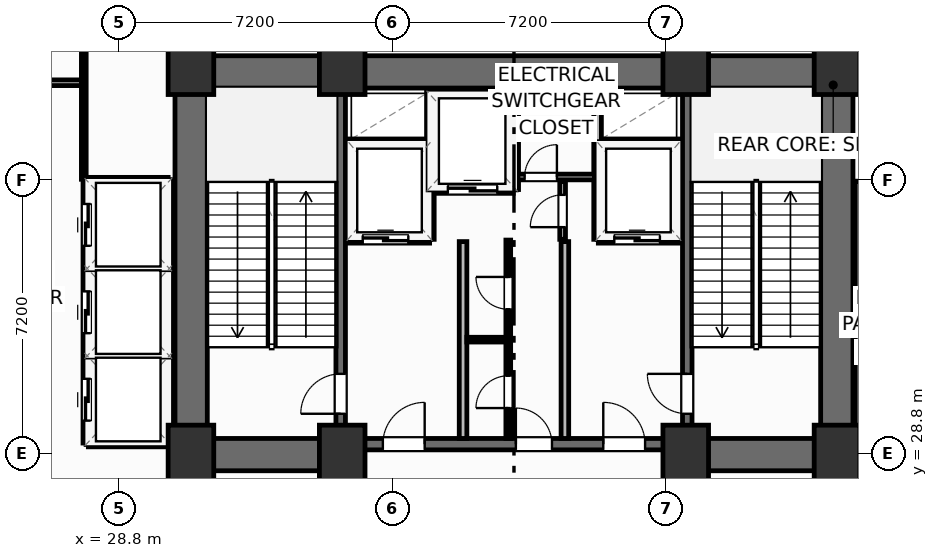
"""IFC4 building model, lengths in metres.
Left out: names, types, materials, properties, quantities, classifications, styles, units other than length and angle.
Written with IfcOpenShell. Run it as: python <this file> out.ifc"""

import sys

from ifc_helpers import new_model, si_unit, direction, frame, frame_2d, origin, origin_2d, place, context, subcontext, project, spatial, rectangle, extrude, element, fill, save


model = new_model("IFC4")
c1 = context("Model", 3, precision=1e-05, world=origin(), true_north=direction((0.0, 1.0)))
c2 = subcontext(c1, "Body", "Model", "MODEL_VIEW")
j1 = project(units=[si_unit("LENGTHUNIT", "METRE"), si_unit("PLANEANGLEUNIT", "RADIAN")], contexts=[c1])
p1 = place(None, origin())
s1 = spatial("IfcSite", under=j1, at=p1, CompositionType="ELEMENT")
p2 = place(p1, origin())
s2 = spatial("IfcBuilding", under=s1, at=p2, CompositionType="ELEMENT")
p3 = place(p2, frame((0.0, 0.0, 21.6)))
s3 = spatial("IfcBuildingStorey", under=s2, at=p3, CompositionType="ELEMENT", Elevation=21.6)
for number, where, z_axis, x_axis in (
    (1, (30.7, 28.75, 0.0), (0.0, 0.0, 1.0), (1.0, 0.0, 0.0)),
    (2, (34.68, 28.75, 0.0), (0.0, 0.0, 1.0), (1.0, 0.0, 0.0)),
    (3, (43.72, 28.75, 0.0), (0.0, 0.0, 1.0), (1.0, 0.0, 0.0)),
    (4, (47.7, 28.75, 0.0), (0.0, 0.0, 1.0), (1.0, 0.0, 0.0)),
    (5, (30.7, 39.05, 0.0), (0.0, 0.0, 1.0), (1.0, 0.0, 0.0)),
    (6, (34.68, 39.05, 0.0), (0.0, 0.0, 1.0), (1.0, 0.0, 0.0)),
    (7, (43.72, 39.05, 0.0), (0.0, 0.0, 1.0), (1.0, 0.0, 0.0)),
    (8, (47.7, 39.05, 0.0), (0.0, 0.0, 1.0), (1.0, 0.0, 0.0)),
):
    element("IfcColumn", number, at=place(p3, frame(where, z_axis=z_axis, x_axis=x_axis)), inside=s3, PredefinedType="COLUMN", context=c2, shape_type="SweptSolid", body=[
        extrude(rectangle(XDim=1.2, YDim=1.6, at=origin_2d()), origin(), (0.0, 0.0, 1.0), 5.4),
    ])
p4 = place(p3, frame((30.28, 38.845, 0.0), z_axis=(0.0, 0.0, 1.0), x_axis=(1.0, 0.0, 0.0)))
e9 = element("IfcWall", 9, at=p4, inside=s3, PredefinedType="SHEAR", context=c2, shape_type="SweptSolid", body=[
    extrude(rectangle(XDim=17.84, YDim=0.85, at=frame_2d((8.92, 0.0))), origin(), (0.0, 0.0, 1.0), 5.15),
])
for number, where, z_axis, x_axis in (
    (10, (30.705, 29.2, 0.0), (0.0, 0.0, 1.0), (0.0, 1.0, 0.0)),
    (11, (47.695, 29.2, 0.0), (0.0, 0.0, 1.0), (0.0, 1.0, 0.0)),
):
    element("IfcWall", number, at=place(p3, frame(where, z_axis=z_axis, x_axis=x_axis)), inside=s3, PredefinedType="SHEAR", context=c2, shape_type="SweptSolid", body=[
        extrude(rectangle(XDim=9.22, YDim=0.85, at=frame_2d((4.61, 0.0))), origin(), (0.0, 0.0, 1.0), 5.15),
    ])
for number, where, z_axis, x_axis in (
    (12, (30.28, 28.775, 0.0), (0.0, 0.0, 1.0), (1.0, 0.0, 0.0)),
    (13, (43.6, 28.775, 0.0), (0.0, 0.0, 1.0), (1.0, 0.0, 0.0)),
):
    element("IfcWall", number, at=place(p3, frame(where, z_axis=z_axis, x_axis=x_axis)), inside=s3, PredefinedType="SHEAR", context=c2, shape_type="SweptSolid", body=[
        extrude(rectangle(XDim=4.52, YDim=0.85, at=frame_2d((2.26, 0.0))), origin(), (0.0, 0.0, 1.0), 5.15),
    ])
p5 = place(p3, frame((34.8, 29.05, 0.0), z_axis=(0.0, 0.0, 1.0), x_axis=(1.0, 0.0, 0.0)))
e14 = element("IfcWall", 14, at=p5, inside=s3, PredefinedType="SHEAR", context=c2, shape_type="SweptSolid", body=[
    extrude(rectangle(XDim=8.8, YDim=0.3, at=frame_2d((4.4, 0.0))), origin(), (0.0, 0.0, 1.0), 5.15),
])
p6 = place(p5, frame((0.95, 0.0, 0.0)))
e15 = element("IfcOpeningElement", 15, at=p6, cuts=e14, PredefinedType="OPENING", context=c2, shape_type="SweptSolid", body=[
    extrude(rectangle(XDim=1.1, YDim=2.15, at=frame_2d((0.55, 1.075))), frame((0.0, 0.16, 0.0), z_axis=(0.0, -1.0, 0.0), x_axis=(1.0, 0.0, 0.0)), (0.0, 0.0, 1.0), 0.32),
])
p7 = place(p5, frame((6.75, 0.0, 0.0)))
e16 = element("IfcOpeningElement", 16, at=p7, cuts=e14, PredefinedType="OPENING", context=c2, shape_type="SweptSolid", body=[
    extrude(rectangle(XDim=1.1, YDim=2.15, at=frame_2d((0.55, 1.075))), frame((0.0, 0.16, 0.0), z_axis=(0.0, -1.0, 0.0), x_axis=(1.0, 0.0, 0.0)), (0.0, 0.0, 1.0), 0.32),
])
p8 = place(p5, frame((4.45, 0.0, 0.0)))
e17 = element("IfcOpeningElement", 17, at=p8, cuts=e14, PredefinedType="OPENING", context=c2, shape_type="SweptSolid", body=[
    extrude(rectangle(XDim=0.95, YDim=2.15, at=frame_2d((0.475, 1.075))), frame((0.0, 0.16, 0.0), z_axis=(0.0, -1.0, 0.0), x_axis=(1.0, 0.0, 0.0)), (0.0, 0.0, 1.0), 0.32),
])
p9 = place(p3, frame((34.64, 29.2, 0.0), z_axis=(0.0, 0.0, 1.0), x_axis=(0.0, 1.0, 0.0)))
e18 = element("IfcWall", 18, at=p9, inside=s3, PredefinedType="SHEAR", context=c2, shape_type="SweptSolid", body=[
    extrude(rectangle(XDim=9.22, YDim=0.25, at=frame_2d((4.61, 0.0))), origin(), (0.0, 0.0, 1.0), 5.15),
])
p10 = place(p9, frame((0.65, 0.0, 0.0)))
e19 = element("IfcOpeningElement", 19, at=p10, cuts=e18, PredefinedType="OPENING", context=c2, shape_type="SweptSolid", body=[
    extrude(rectangle(XDim=1.05, YDim=2.15, at=frame_2d((0.525, 1.075))), frame((0.0, 0.135, 0.0), z_axis=(0.0, -1.0, 0.0), x_axis=(1.0, 0.0, 0.0)), (0.0, 0.0, 1.0), 0.27),
])
p11 = place(p3, frame((43.76, 29.2, 0.0), z_axis=(0.0, 0.0, 1.0), x_axis=(0.0, 1.0, 0.0)))
e20 = element("IfcWall", 20, at=p11, inside=s3, PredefinedType="SHEAR", context=c2, shape_type="SweptSolid", body=[
    extrude(rectangle(XDim=9.22, YDim=0.25, at=frame_2d((4.61, 0.0))), origin(), (0.0, 0.0, 1.0), 5.15),
])
p12 = place(p11, frame((0.65, 0.0, 0.0)))
e21 = element("IfcOpeningElement", 21, at=p12, cuts=e20, PredefinedType="OPENING", context=c2, shape_type="SweptSolid", body=[
    extrude(rectangle(XDim=1.05, YDim=2.15, at=frame_2d((0.525, 1.075))), frame((0.0, 0.135, 0.0), z_axis=(0.0, -1.0, 0.0), x_axis=(1.0, 0.0, 0.0)), (0.0, 0.0, 1.0), 0.27),
])
p13 = place(p3, frame((18.6, 38.56, 0.0), z_axis=(0.0, 0.0, 1.0), x_axis=(1.0, 0.0, 0.0)))
e22 = element("IfcWall", 22, at=p13, inside=s3, PredefinedType="PARTITIONING", context=c2, shape_type="SweptSolid", body=[
    extrude(rectangle(XDim=9.28, YDim=0.15, at=frame_2d((4.64, 0.0))), origin(), (0.0, 0.0, 1.0), 5.15),
])
p14 = place(p13, frame((4.5, 0.0, 0.0)))
e23 = element("IfcOpeningElement", 23, at=p14, cuts=e22, PredefinedType="OPENING", context=c2, shape_type="SweptSolid", body=[
    extrude(rectangle(XDim=0.95, YDim=2.05, at=frame_2d((0.475, 1.025))), frame((0.0, 0.085, 0.0), z_axis=(0.0, -1.0, 0.0), x_axis=(1.0, 0.0, 0.0)), (0.0, 0.0, 1.0), 0.17),
])
p15 = place(p3, frame((27.88, 36.02, 0.0), z_axis=(0.0, 0.0, 1.0), x_axis=(0.0, 1.0, 0.0)))
e24 = element("IfcWall", 24, at=p15, inside=s3, PredefinedType="PARTITIONING", context=c2, shape_type="SweptSolid", body=[
    extrude(rectangle(XDim=14.18, YDim=0.125, at=frame_2d((7.09, 0.0))), origin(), (0.0, 0.0, 1.0), 5.15),
])
for number, where, z_axis, x_axis in (
    (25, (37.86, 29.2, 0.0), (0.0, 0.0, 1.0), (0.0, 1.0, 0.0)),
    (26, (40.54, 29.2, 0.0), (0.0, 0.0, 1.0), (0.0, 1.0, 0.0)),
):
    element("IfcWall", number, at=place(p3, frame(where, z_axis=z_axis, x_axis=x_axis)), inside=s3, PredefinedType="PARTITIONING", context=c2, shape_type="SweptSolid", body=[
        extrude(rectangle(XDim=5.18, YDim=0.2, at=frame_2d((2.59, 0.0))), origin(), (0.0, 0.0, 1.0), 5.15),
    ])
p16 = place(p3, frame((34.8, 34.44, 0.0), z_axis=(0.0, 0.0, 1.0), x_axis=(1.0, 0.0, 0.0)))
e27 = element("IfcWall", 27, at=p16, inside=s3, PredefinedType="PARTITIONING", context=c2, shape_type="SweptSolid", body=[
    extrude(rectangle(XDim=2.18, YDim=0.2, at=frame_2d((1.09, 0.0))), origin(), (0.0, 0.0, 1.0), 5.15),
])
p17 = place(p16, frame((0.42, 0.0, 0.0)))
e28 = element("IfcOpeningElement", 28, at=p17, cuts=e27, PredefinedType="OPENING", context=c2, shape_type="SweptSolid", body=[
    extrude(rectangle(XDim=1.2, YDim=2.2, at=frame_2d((0.6, 1.1))), frame((0.0, 0.11, 0.0), z_axis=(0.0, -1.0, 0.0), x_axis=(1.0, 0.0, 0.0)), (0.0, 0.0, 1.0), 0.22),
])
p18 = place(p3, frame((34.8, 36.98, 0.0), z_axis=(0.0, 0.0, 1.0), x_axis=(1.0, 0.0, 0.0)))
e29 = element("IfcWall", 29, at=p18, inside=s3, PredefinedType="PARTITIONING", context=c2, shape_type="SweptSolid", body=[
    extrude(rectangle(XDim=2.18, YDim=0.2, at=frame_2d((1.09, 0.0))), origin(), (0.0, 0.0, 1.0), 5.15),
])
p19 = place(p3, frame((37.0, 34.44, 0.0), z_axis=(0.0, 0.0, 1.0), x_axis=(0.0, 1.0, 0.0)))
e30 = element("IfcWall", 30, at=p19, inside=s3, PredefinedType="PARTITIONING", context=c2, shape_type="SweptSolid", body=[
    extrude(rectangle(XDim=3.9, YDim=0.2, at=frame_2d((1.95, 0.0))), origin(), (0.0, 0.0, 1.0), 5.15),
])
p20 = place(p3, frame((41.42, 34.44, 0.0), z_axis=(0.0, 0.0, 1.0), x_axis=(1.0, 0.0, 0.0)))
e31 = element("IfcWall", 31, at=p20, inside=s3, PredefinedType="PARTITIONING", context=c2, shape_type="SweptSolid", body=[
    extrude(rectangle(XDim=2.18, YDim=0.2, at=frame_2d((1.09, 0.0))), origin(), (0.0, 0.0, 1.0), 5.15),
])
p21 = place(p20, frame((0.42, 0.0, 0.0)))
e32 = element("IfcOpeningElement", 32, at=p21, cuts=e31, PredefinedType="OPENING", context=c2, shape_type="SweptSolid", body=[
    extrude(rectangle(XDim=1.2, YDim=2.2, at=frame_2d((0.6, 1.1))), frame((0.0, 0.11, 0.0), z_axis=(0.0, -1.0, 0.0), x_axis=(1.0, 0.0, 0.0)), (0.0, 0.0, 1.0), 0.22),
])
p22 = place(p3, frame((41.42, 36.98, 0.0), z_axis=(0.0, 0.0, 1.0), x_axis=(1.0, 0.0, 0.0)))
e33 = element("IfcWall", 33, at=p22, inside=s3, PredefinedType="PARTITIONING", context=c2, shape_type="SweptSolid", body=[
    extrude(rectangle(XDim=2.18, YDim=0.2, at=frame_2d((1.09, 0.0))), origin(), (0.0, 0.0, 1.0), 5.15),
])
p23 = place(p3, frame((41.4, 34.44, 0.0), z_axis=(0.0, 0.0, 1.0), x_axis=(0.0, 1.0, 0.0)))
e34 = element("IfcWall", 34, at=p23, inside=s3, PredefinedType="PARTITIONING", context=c2, shape_type="SweptSolid", body=[
    extrude(rectangle(XDim=3.9, YDim=0.2, at=frame_2d((1.95, 0.0))), origin(), (0.0, 0.0, 1.0), 5.15),
])
p24 = place(p3, frame((37.06, 35.75, 0.0), z_axis=(0.0, 0.0, 1.0), x_axis=(1.0, 0.0, 0.0)))
e35 = element("IfcWall", 35, at=p24, inside=s3, PredefinedType="PARTITIONING", context=c2, shape_type="SweptSolid", body=[
    extrude(rectangle(XDim=2.12, YDim=0.2, at=frame_2d((1.06, 0.0))), origin(), (0.0, 0.0, 1.0), 5.15),
])
p25 = place(p24, frame((0.4, 0.0, 0.0)))
e36 = element("IfcOpeningElement", 36, at=p25, cuts=e35, PredefinedType="OPENING", context=c2, shape_type="SweptSolid", body=[
    extrude(rectangle(XDim=1.3, YDim=2.2, at=frame_2d((0.65, 1.1))), frame((0.0, 0.11, 0.0), z_axis=(0.0, -1.0, 0.0), x_axis=(1.0, 0.0, 0.0)), (0.0, 0.0, 1.0), 0.22),
])
p26 = place(p3, frame((39.22, 35.75, 0.0), z_axis=(0.0, 0.0, 1.0), x_axis=(0.0, 1.0, 0.0)))
e37 = element("IfcWall", 37, at=p26, inside=s3, PredefinedType="PARTITIONING", context=c2, shape_type="SweptSolid", body=[
    extrude(rectangle(XDim=2.59, YDim=0.2, at=frame_2d((1.295, 0.0))), origin(), (0.0, 0.0, 1.0), 5.15),
])
p27 = place(p3, frame((39.3, 36.08, 0.0), z_axis=(0.0, 0.0, 1.0), x_axis=(1.0, 0.0, 0.0)))
e38 = element("IfcWall", 38, at=p27, inside=s3, PredefinedType="PARTITIONING", context=c2, shape_type="SweptSolid", body=[
    extrude(rectangle(XDim=2.02, YDim=0.15, at=frame_2d((1.01, 0.0))), origin(), (0.0, 0.0, 1.0), 5.15),
])
p28 = place(p27, frame((0.18, 0.0, 0.0)))
e39 = element("IfcOpeningElement", 39, at=p28, cuts=e38, PredefinedType="OPENING", context=c2, shape_type="SweptSolid", body=[
    extrude(rectangle(XDim=0.85, YDim=2.05, at=frame_2d((0.425, 1.025))), frame((0.0, 0.085, 0.0), z_axis=(0.0, -1.0, 0.0), x_axis=(1.0, 0.0, 0.0)), (0.0, 0.0, 1.0), 0.17),
])
p29 = place(p3, frame((40.48, 34.44, 0.0), z_axis=(0.0, 0.0, 1.0), x_axis=(0.0, 1.0, 0.0)))
e40 = element("IfcWall", 40, at=p29, inside=s3, PredefinedType="PARTITIONING", context=c2, shape_type="SweptSolid", body=[
    extrude(rectangle(XDim=1.52, YDim=0.15, at=frame_2d((0.76, 0.0))), origin(), (0.0, 0.0, 1.0), 5.15),
])
p30 = place(p29, frame((0.32, 0.0, 0.0)))
e41 = element("IfcOpeningElement", 41, at=p30, cuts=e40, PredefinedType="OPENING", context=c2, shape_type="SweptSolid", body=[
    extrude(rectangle(XDim=0.85, YDim=2.05, at=frame_2d((0.425, 1.025))), frame((0.0, 0.085, 0.0), z_axis=(0.0, -1.0, 0.0), x_axis=(1.0, 0.0, 0.0)), (0.0, 0.0, 1.0), 0.17),
])
p31 = place(p3, frame((37.96, 31.8, 0.0), z_axis=(0.0, 0.0, 1.0), x_axis=(1.0, 0.0, 0.0)))
e42 = element("IfcWall", 42, at=p31, inside=s3, PredefinedType="PARTITIONING", context=c2, shape_type="SweptSolid", body=[
    extrude(rectangle(XDim=1.09, YDim=0.125, at=frame_2d((0.545, 0.0))), origin(), (0.0, 0.0, 1.0), 5.15),
])
p32 = place(p3, frame((39.05, 29.2, 0.0), z_axis=(0.0, 0.0, 1.0), x_axis=(0.0, 1.0, 0.0)))
e43 = element("IfcWall", 43, at=p32, inside=s3, PredefinedType="PARTITIONING", context=c2, shape_type="SweptSolid", body=[
    extrude(rectangle(XDim=5.22, YDim=0.125, at=frame_2d((2.61, 0.0))), origin(), (0.0, 0.0, 1.0), 5.15),
])
p33 = place(p32, frame((0.8, 0.0, 0.0)))
e44 = element("IfcOpeningElement", 44, at=p33, cuts=e43, PredefinedType="OPENING", context=c2, shape_type="SweptSolid", body=[
    extrude(rectangle(XDim=0.85, YDim=2.05, at=frame_2d((0.425, 1.025))), frame((0.0, 0.073, 0.0), z_axis=(0.0, -1.0, 0.0), x_axis=(1.0, 0.0, 0.0)), (0.0, 0.0, 1.0), 0.145),
])
p34 = place(p32, frame((3.4, 0.0, 0.0)))
e45 = element("IfcOpeningElement", 45, at=p34, cuts=e43, PredefinedType="OPENING", context=c2, shape_type="SweptSolid", body=[
    extrude(rectangle(XDim=0.85, YDim=2.05, at=frame_2d((0.425, 1.025))), frame((0.0, 0.073, 0.0), z_axis=(0.0, -1.0, 0.0), x_axis=(1.0, 0.0, 0.0)), (0.0, 0.0, 1.0), 0.145),
])
for number, where, z_axis, x_axis in (
    (46, (28.02, 31.375, 0.0), (0.0, 0.0, 1.0), (1.0, 0.0, 0.0)),
    (47, (28.02, 33.675, 0.0), (0.0, 0.0, 1.0), (1.0, 0.0, 0.0)),
):
    element("IfcWall", number, at=place(p3, frame(where, z_axis=z_axis, x_axis=x_axis)), inside=s3, PredefinedType="PARTITIONING", context=c2, shape_type="SweptSolid", body=[
        extrude(rectangle(XDim=2.06, YDim=0.2, at=frame_2d((1.03, 0.0))), origin(), (0.0, 0.0, 1.0), 5.15),
    ])
for number, where, z_axis, x_axis in (
    (48, (28.0, 29.08, 0.0), (0.0, 0.0, 1.0), (1.0, 0.0, 0.0)),
    (49, (28.0, 35.97, 0.0), (0.0, 0.0, 1.0), (1.0, 0.0, 0.0)),
):
    element("IfcWall", number, at=place(p3, frame(where, z_axis=z_axis, x_axis=x_axis)), inside=s3, PredefinedType="PARTITIONING", context=c2, shape_type="SweptSolid", body=[
        extrude(rectangle(XDim=2.1, YDim=0.2, at=frame_2d((1.05, 0.0))), origin(), (0.0, 0.0, 1.0), 5.15),
    ])
p35 = place(p3, frame((30.12, 29.08, 0.0), z_axis=(0.0, 0.0, 1.0), x_axis=(0.0, 1.0, 0.0)))
e50 = element("IfcWall", 50, at=p35, inside=s3, PredefinedType="PARTITIONING", context=c2, shape_type="SweptSolid", body=[
    extrude(rectangle(XDim=6.89, YDim=0.2, at=frame_2d((3.445, 0.0))), origin(), (0.0, 0.0, 1.0), 5.15),
])
p36 = place(p3, frame((27.96, 29.08, 0.0), z_axis=(0.0, 0.0, 1.0), x_axis=(0.0, 1.0, 0.0)))
e51 = element("IfcWall", 51, at=p36, inside=s3, PredefinedType="PARTITIONING", context=c2, shape_type="SweptSolid", body=[
    extrude(rectangle(XDim=6.89, YDim=0.2, at=frame_2d((3.445, 0.0))), origin(), (0.0, 0.0, 1.0), 5.15),
])
p37 = place(p36, frame((0.59, 0.0, 0.0)))
e52 = element("IfcOpeningElement", 52, at=p37, cuts=e51, PredefinedType="OPENING", context=c2, shape_type="SweptSolid", body=[
    extrude(rectangle(XDim=1.1, YDim=2.15, at=frame_2d((0.55, 1.075))), frame((0.0, 0.11, 0.0), z_axis=(0.0, -1.0, 0.0), x_axis=(1.0, 0.0, 0.0)), (0.0, 0.0, 1.0), 0.22),
])
p38 = place(p36, frame((2.89, 0.0, 0.0)))
e53 = element("IfcOpeningElement", 53, at=p38, cuts=e51, PredefinedType="OPENING", context=c2, shape_type="SweptSolid", body=[
    extrude(rectangle(XDim=1.1, YDim=2.15, at=frame_2d((0.55, 1.075))), frame((0.0, 0.11, 0.0), z_axis=(0.0, -1.0, 0.0), x_axis=(1.0, 0.0, 0.0)), (0.0, 0.0, 1.0), 0.22),
])
p39 = place(p36, frame((5.19, 0.0, 0.0)))
e54 = element("IfcOpeningElement", 54, at=p39, cuts=e51, PredefinedType="OPENING", context=c2, shape_type="SweptSolid", body=[
    extrude(rectangle(XDim=1.1, YDim=2.15, at=frame_2d((0.55, 1.075))), frame((0.0, 0.11, 0.0), z_axis=(0.0, -1.0, 0.0), x_axis=(1.0, 0.0, 0.0)), (0.0, 0.0, 1.0), 0.22),
])
p40 = place(p3, frame((48.28, 29.08, 0.0), z_axis=(0.0, 0.0, 1.0), x_axis=(0.0, 1.0, 0.0)))
e55 = element("IfcWall", 55, at=p40, inside=s3, PredefinedType="PARTITIONING", context=c2, shape_type="SweptSolid", body=[
    extrude(rectangle(XDim=6.89, YDim=0.2, at=frame_2d((3.445, 0.0))), origin(), (0.0, 0.0, 1.0), 5.15),
])
p41 = place(p10, origin())
e56 = element("IfcDoor", 56, at=p41, inside=s3, OperationType="SINGLE_SWING_LEFT", PredefinedType="DOOR", context=c2, shape_type="SweptSolid", body=[
    extrude(rectangle(XDim=1.05, YDim=2.15, at=frame_2d((0.525, 1.075))), frame((0.0, 0.025, 0.0), z_axis=(0.0, -1.0, 0.0), x_axis=(1.0, 0.0, 0.0)), (0.0, 0.0, 1.0), 0.05),
])
fill(e19, e56)
p42 = place(p12, origin())
e57 = element("IfcDoor", 57, at=p42, inside=s3, OperationType="SINGLE_SWING_RIGHT", PredefinedType="DOOR", context=c2, shape_type="SweptSolid", body=[
    extrude(rectangle(XDim=1.05, YDim=2.15, at=frame_2d((0.525, 1.075))), frame((0.0, 0.025, 0.0), z_axis=(0.0, -1.0, 0.0), x_axis=(1.0, 0.0, 0.0)), (0.0, 0.0, 1.0), 0.05),
])
fill(e21, e57)
p43 = place(p6, origin())
e58 = element("IfcDoor", 58, at=p43, inside=s3, OperationType="SINGLE_SWING_RIGHT", PredefinedType="DOOR", context=c2, shape_type="SweptSolid", body=[
    extrude(rectangle(XDim=1.1, YDim=2.15, at=frame_2d((0.55, 1.075))), frame((0.0, 0.025, 0.0), z_axis=(0.0, -1.0, 0.0), x_axis=(1.0, 0.0, 0.0)), (0.0, 0.0, 1.0), 0.05),
])
fill(e15, e58)
p44 = place(p7, origin())
e59 = element("IfcDoor", 59, at=p44, inside=s3, OperationType="SINGLE_SWING_LEFT", PredefinedType="DOOR", context=c2, shape_type="SweptSolid", body=[
    extrude(rectangle(XDim=1.1, YDim=2.15, at=frame_2d((0.55, 1.075))), frame((0.0, 0.025, 0.0), z_axis=(0.0, -1.0, 0.0), x_axis=(1.0, 0.0, 0.0)), (0.0, 0.0, 1.0), 0.05),
])
fill(e16, e59)
p45 = place(p17, origin())
e60 = element("IfcDoor", 60, at=p45, inside=s3, OperationType="SLIDING_TO_LEFT", PredefinedType="DOOR", context=c2, shape_type="SweptSolid", body=[
    extrude(rectangle(XDim=1.2, YDim=2.2, at=frame_2d((0.6, 1.1))), frame((0.0, 0.025, 0.0), z_axis=(0.0, -1.0, 0.0), x_axis=(1.0, 0.0, 0.0)), (0.0, 0.0, 1.0), 0.05),
])
fill(e28, e60)
p46 = place(p21, origin())
e61 = element("IfcDoor", 61, at=p46, inside=s3, OperationType="SLIDING_TO_LEFT", PredefinedType="DOOR", context=c2, shape_type="SweptSolid", body=[
    extrude(rectangle(XDim=1.2, YDim=2.2, at=frame_2d((0.6, 1.1))), frame((0.0, 0.025, 0.0), z_axis=(0.0, -1.0, 0.0), x_axis=(1.0, 0.0, 0.0)), (0.0, 0.0, 1.0), 0.05),
])
fill(e32, e61)
p47 = place(p25, origin())
e62 = element("IfcDoor", 62, at=p47, inside=s3, OperationType="SLIDING_TO_LEFT", PredefinedType="DOOR", context=c2, shape_type="SweptSolid", body=[
    extrude(rectangle(XDim=1.3, YDim=2.2, at=frame_2d((0.65, 1.1))), frame((0.0, 0.025, 0.0), z_axis=(0.0, -1.0, 0.0), x_axis=(1.0, 0.0, 0.0)), (0.0, 0.0, 1.0), 0.05),
])
fill(e36, e62)
p48 = place(p28, origin())
e63 = element("IfcDoor", 63, at=p48, inside=s3, OperationType="SINGLE_SWING_RIGHT", PredefinedType="DOOR", context=c2, shape_type="SweptSolid", body=[
    extrude(rectangle(XDim=0.85, YDim=2.05, at=frame_2d((0.425, 1.025))), frame((0.0, 0.025, 0.0), z_axis=(0.0, -1.0, 0.0), x_axis=(1.0, 0.0, 0.0)), (0.0, 0.0, 1.0), 0.05),
])
fill(e39, e63)
p49 = place(p30, origin())
e64 = element("IfcDoor", 64, at=p49, inside=s3, OperationType="SINGLE_SWING_LEFT", PredefinedType="DOOR", context=c2, shape_type="SweptSolid", body=[
    extrude(rectangle(XDim=0.85, YDim=2.05, at=frame_2d((0.425, 1.025))), frame((0.0, 0.025, 0.0), z_axis=(0.0, -1.0, 0.0), x_axis=(1.0, 0.0, 0.0)), (0.0, 0.0, 1.0), 0.05),
])
fill(e41, e64)
p50 = place(p33, origin())
e65 = element("IfcDoor", 65, at=p50, inside=s3, OperationType="SINGLE_SWING_LEFT", PredefinedType="DOOR", context=c2, shape_type="SweptSolid", body=[
    extrude(rectangle(XDim=0.85, YDim=2.05, at=frame_2d((0.425, 1.025))), frame((0.0, 0.025, 0.0), z_axis=(0.0, -1.0, 0.0), x_axis=(1.0, 0.0, 0.0)), (0.0, 0.0, 1.0), 0.05),
])
fill(e44, e65)
p51 = place(p34, origin())
e66 = element("IfcDoor", 66, at=p51, inside=s3, OperationType="SINGLE_SWING_RIGHT", PredefinedType="DOOR", context=c2, shape_type="SweptSolid", body=[
    extrude(rectangle(XDim=0.85, YDim=2.05, at=frame_2d((0.425, 1.025))), frame((0.0, 0.025, 0.0), z_axis=(0.0, -1.0, 0.0), x_axis=(1.0, 0.0, 0.0)), (0.0, 0.0, 1.0), 0.05),
])
fill(e45, e66)
p52 = place(p8, origin())
e67 = element("IfcDoor", 67, at=p52, inside=s3, OperationType="SINGLE_SWING_LEFT", PredefinedType="DOOR", context=c2, shape_type="SweptSolid", body=[
    extrude(rectangle(XDim=0.95, YDim=2.15, at=frame_2d((0.475, 1.075))), frame((0.0, 0.025, 0.0), z_axis=(0.0, -1.0, 0.0), x_axis=(1.0, 0.0, 0.0)), (0.0, 0.0, 1.0), 0.05),
])
fill(e17, e67)
p53 = place(p37, origin())
e68 = element("IfcDoor", 68, at=p53, inside=s3, OperationType="SLIDING_TO_LEFT", PredefinedType="DOOR", context=c2, shape_type="SweptSolid", body=[
    extrude(rectangle(XDim=1.1, YDim=2.15, at=frame_2d((0.55, 1.075))), frame((0.0, 0.025, 0.0), z_axis=(0.0, -1.0, 0.0), x_axis=(1.0, 0.0, 0.0)), (0.0, 0.0, 1.0), 0.05),
])
fill(e52, e68)
p54 = place(p38, origin())
e69 = element("IfcDoor", 69, at=p54, inside=s3, OperationType="SLIDING_TO_LEFT", PredefinedType="DOOR", context=c2, shape_type="SweptSolid", body=[
    extrude(rectangle(XDim=1.1, YDim=2.15, at=frame_2d((0.55, 1.075))), frame((0.0, 0.025, 0.0), z_axis=(0.0, -1.0, 0.0), x_axis=(1.0, 0.0, 0.0)), (0.0, 0.0, 1.0), 0.05),
])
fill(e53, e69)
p55 = place(p39, origin())
e70 = element("IfcDoor", 70, at=p55, inside=s3, OperationType="SLIDING_TO_LEFT", PredefinedType="DOOR", context=c2, shape_type="SweptSolid", body=[
    extrude(rectangle(XDim=1.1, YDim=2.15, at=frame_2d((0.55, 1.075))), frame((0.0, 0.025, 0.0), z_axis=(0.0, -1.0, 0.0), x_axis=(1.0, 0.0, 0.0)), (0.0, 0.0, 1.0), 0.05),
])
fill(e54, e70)
save(model, sys.argv[1])
